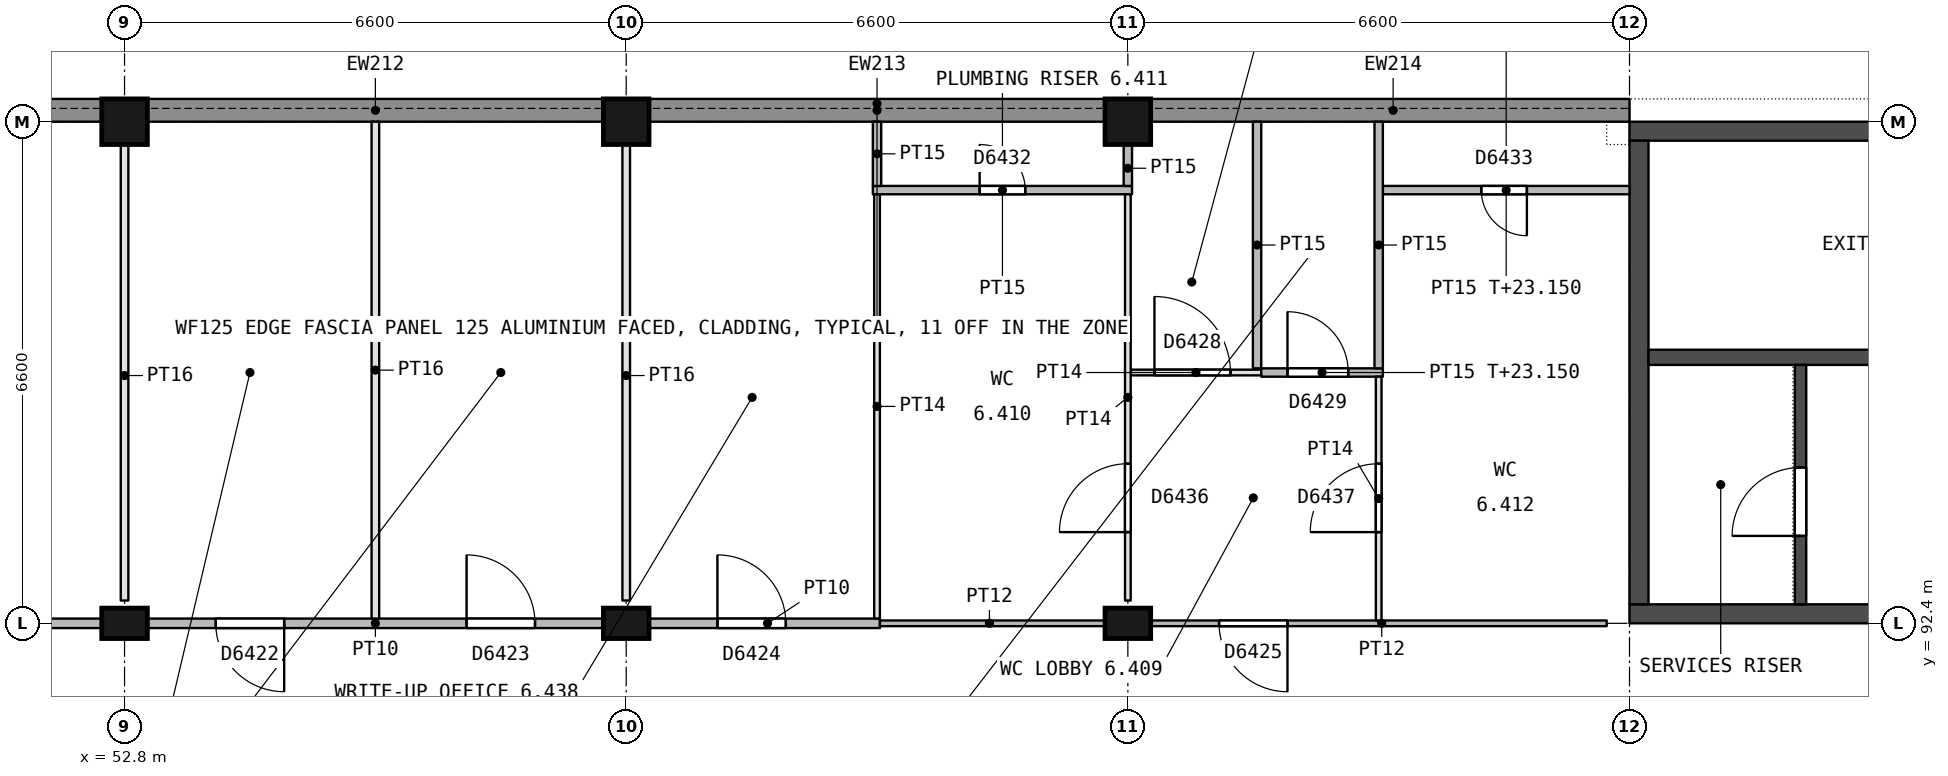
"""IFC4 building model, lengths in metres.
Left out: names, types, materials, properties, quantities, classifications, styles, units other than length and angle.
Written with IfcOpenShell. Run it as: python <this file> out.ifc"""

import sys

from ifc_helpers import new_model, si_unit, direction, frame, frame_2d, origin, origin_2d, place, context, subcontext, project, spatial, rectangle, extrude, element, fill, save


model = new_model("IFC4")
c1 = context("Model", 3, precision=1e-05, world=origin(), true_north=direction((0.0, 1.0)))
c2 = subcontext(c1, "Body", "Model", "MODEL_VIEW")
j1 = project(units=[si_unit("LENGTHUNIT", "METRE"), si_unit("PLANEANGLEUNIT", "RADIAN")], contexts=[c1])
p1 = place(None, origin())
s1 = spatial("IfcSite", under=j1, at=p1, CompositionType="ELEMENT")
p2 = place(p1, origin())
s2 = spatial("IfcBuilding", under=s1, at=p2, CompositionType="ELEMENT")
p3 = place(p2, frame((0.0, 0.0, 18.9)))
s3 = spatial("IfcBuildingStorey", under=s2, at=p3, CompositionType="ELEMENT", Elevation=18.9)
p4 = place(p3, frame((52.8, 92.4, 0.0), z_axis=(0.0, 0.0, 1.0), x_axis=(1.0, 0.0, 0.0)))
e1 = element("IfcColumn", 1, at=p4, inside=s3, PredefinedType="COLUMN", context=c2, shape_type="SweptSolid", body=[
    extrude(rectangle(XDim=0.6, YDim=0.4, at=origin_2d()), origin(), (0.0, 0.0, 1.0), 4.25),
])
p5 = place(p3, frame((52.8, 99.0, 0.0), z_axis=(0.0, 0.0, 1.0), x_axis=(1.0, 0.0, 0.0)))
e2 = element("IfcColumn", 2, at=p5, inside=s3, PredefinedType="COLUMN", context=c2, shape_type="SweptSolid", body=[
    extrude(rectangle(XDim=0.6, YDim=0.6, at=origin_2d()), origin(), (0.0, 0.0, 1.0), 4.25),
])
p6 = place(p3, frame((59.4, 92.4, 0.0), z_axis=(0.0, 0.0, 1.0), x_axis=(1.0, 0.0, 0.0)))
e3 = element("IfcColumn", 3, at=p6, inside=s3, PredefinedType="COLUMN", context=c2, shape_type="SweptSolid", body=[
    extrude(rectangle(XDim=0.6, YDim=0.4, at=origin_2d()), origin(), (0.0, 0.0, 1.0), 4.25),
])
p7 = place(p3, frame((59.4, 99.0, 0.0), z_axis=(0.0, 0.0, 1.0), x_axis=(1.0, 0.0, 0.0)))
e4 = element("IfcColumn", 4, at=p7, inside=s3, PredefinedType="COLUMN", context=c2, shape_type="SweptSolid", body=[
    extrude(rectangle(XDim=0.6, YDim=0.6, at=origin_2d()), origin(), (0.0, 0.0, 1.0), 4.25),
])
p8 = place(p3, frame((66.0, 92.4, 0.0), z_axis=(0.0, 0.0, 1.0), x_axis=(1.0, 0.0, 0.0)))
e5 = element("IfcColumn", 5, at=p8, inside=s3, PredefinedType="COLUMN", context=c2, shape_type="SweptSolid", body=[
    extrude(rectangle(XDim=0.6, YDim=0.4, at=origin_2d()), origin(), (0.0, 0.0, 1.0), 4.25),
])
p9 = place(p3, frame((66.0, 99.0, 0.0), z_axis=(0.0, 0.0, 1.0), x_axis=(1.0, 0.0, 0.0)))
e6 = element("IfcColumn", 6, at=p9, inside=s3, PredefinedType="COLUMN", context=c2, shape_type="SweptSolid", body=[
    extrude(rectangle(XDim=0.6, YDim=0.6, at=origin_2d()), origin(), (0.0, 0.0, 1.0), 4.25),
])
p10 = place(p3, frame((72.6, 92.525, 0.0), z_axis=(0.0, 0.0, 1.0), x_axis=(1.0, 0.0, 0.0)))
e7 = element("IfcWall", 7, at=p10, inside=s3, PredefinedType="SHEAR", context=c2, shape_type="SweptSolid", body=[
    extrude(rectangle(XDim=6.6, YDim=0.25, at=frame_2d((3.3, 0.0))), origin(), (0.0, 0.0, 1.0), 4.25),
])
p11 = place(p10, frame((4.6, 0.0, 0.0)))
e8 = element("IfcOpeningElement", 8, at=p11, cuts=e7, PredefinedType="OPENING", context=c2, shape_type="SweptSolid", body=[
    extrude(rectangle(XDim=1.0, YDim=2.1, at=frame_2d((0.5, 1.05))), frame((0.0, 0.135, 0.0), z_axis=(0.0, -1.0, 0.0), x_axis=(1.0, 0.0, 0.0)), (0.0, 0.0, 1.0), 0.27),
])
p12 = place(p3, frame((72.6, 98.875, 0.0), z_axis=(0.0, 0.0, 1.0), x_axis=(1.0, 0.0, 0.0)))
e9 = element("IfcWall", 9, at=p12, inside=s3, PredefinedType="SHEAR", context=c2, shape_type="SweptSolid", body=[
    extrude(rectangle(XDim=6.6, YDim=0.25, at=frame_2d((3.3, 0.0))), origin(), (0.0, 0.0, 1.0), 4.25),
])
p13 = place(p3, frame((72.725, 92.65, 0.0), z_axis=(0.0, 0.0, 1.0), x_axis=(0.0, 1.0, 0.0)))
e10 = element("IfcWall", 10, at=p13, inside=s3, PredefinedType="SHEAR", context=c2, shape_type="SweptSolid", body=[
    extrude(rectangle(XDim=6.1, YDim=0.25, at=frame_2d((3.05, 0.0))), origin(), (0.0, 0.0, 1.0), 4.25),
])
p14 = place(p3, frame((72.85, 95.9, 0.0), z_axis=(0.0, 0.0, 1.0), x_axis=(1.0, 0.0, 0.0)))
e11 = element("IfcWall", 11, at=p14, inside=s3, PredefinedType="SHEAR", context=c2, shape_type="SweptSolid", body=[
    extrude(rectangle(XDim=6.1, YDim=0.2, at=frame_2d((3.05, 0.0))), origin(), (0.0, 0.0, 1.0), 4.25),
])
p15 = place(p14, frame((4.95, 0.0, 0.0)))
e12 = element("IfcOpeningElement", 12, at=p15, cuts=e11, PredefinedType="OPENING", context=c2, shape_type="SweptSolid", body=[
    extrude(rectangle(XDim=1.0, YDim=2.1, at=frame_2d((0.5, 1.05))), frame((0.0, 0.11, 0.0), z_axis=(0.0, -1.0, 0.0), x_axis=(1.0, 0.0, 0.0)), (0.0, 0.0, 1.0), 0.22),
])
p16 = place(p3, frame((74.85, 92.65, 0.0), z_axis=(0.0, 0.0, 1.0), x_axis=(0.0, 1.0, 0.0)))
e13 = element("IfcWall", 13, at=p16, inside=s3, PredefinedType="SHEAR", context=c2, shape_type="SweptSolid", body=[
    extrude(rectangle(XDim=3.15, YDim=0.15, at=frame_2d((1.575, 0.0))), origin(), (0.0, 0.0, 1.0), 4.25),
])
p17 = place(p16, frame((0.9, 0.0, 0.0)))
e14 = element("IfcOpeningElement", 14, at=p17, cuts=e13, PredefinedType="OPENING", context=c2, shape_type="SweptSolid", body=[
    extrude(rectangle(XDim=0.9, YDim=2.1, at=frame_2d((0.45, 1.05))), frame((0.0, 0.085, 0.0), z_axis=(0.0, -1.0, 0.0), x_axis=(1.0, 0.0, 0.0)), (0.0, 0.0, 1.0), 0.17),
])
for number, where, z_axis, x_axis in (
    (15, (46.5, 99.15, 0.0), (0.0, 0.0, 1.0), (1.0, 0.0, 0.0)),
    (16, (53.1, 99.15, 0.0), (0.0, 0.0, 1.0), (1.0, 0.0, 0.0)),
    (17, (59.7, 99.15, 0.0), (0.0, 0.0, 1.0), (1.0, 0.0, 0.0)),
):
    element("IfcWall", number, at=place(p3, frame(where, z_axis=z_axis, x_axis=x_axis)), inside=s3, PredefinedType="STANDARD", context=c2, shape_type="SweptSolid", body=[
        extrude(rectangle(XDim=6.0, YDim=0.3, at=frame_2d((3.0, 0.0))), origin(), (0.0, 0.0, 1.0), 3.65),
    ])
p18 = place(p3, frame((66.3, 99.15, 0.0), z_axis=(0.0, 0.0, 1.0), x_axis=(1.0, 0.0, 0.0)))
e18 = element("IfcWall", 18, at=p18, inside=s3, PredefinedType="STANDARD", context=c2, shape_type="SweptSolid", body=[
    extrude(rectangle(XDim=6.3, YDim=0.3, at=frame_2d((3.15, 0.0))), origin(), (0.0, 0.0, 1.0), 3.65),
])
p19 = place(p3, frame((46.5, 92.4, 0.0), z_axis=(0.0, 0.0, 1.0), x_axis=(1.0, 0.0, 0.0)))
e19 = element("IfcWall", 19, at=p19, inside=s3, PredefinedType="PARTITIONING", context=c2, shape_type="SweptSolid", body=[
    extrude(rectangle(XDim=6.0, YDim=0.125, at=frame_2d((3.0, 0.0))), origin(), (0.0, 0.0, 1.0), 3.65),
])
p20 = place(p19, frame((0.9, 0.0, 0.0)))
e20 = element("IfcOpeningElement", 20, at=p20, cuts=e19, PredefinedType="OPENING", context=c2, shape_type="SweptSolid", body=[
    extrude(rectangle(XDim=0.9, YDim=2.1, at=frame_2d((0.45, 1.05))), frame((0.0, 0.073, 0.0), z_axis=(0.0, -1.0, 0.0), x_axis=(1.0, 0.0, 0.0)), (0.0, 0.0, 1.0), 0.145),
])
p21 = place(p19, frame((4.2, 0.0, 0.0)))
e21 = element("IfcOpeningElement", 21, at=p21, cuts=e19, PredefinedType="OPENING", context=c2, shape_type="SweptSolid", body=[
    extrude(rectangle(XDim=0.9, YDim=2.1, at=frame_2d((0.45, 1.05))), frame((0.0, 0.073, 0.0), z_axis=(0.0, -1.0, 0.0), x_axis=(1.0, 0.0, 0.0)), (0.0, 0.0, 1.0), 0.145),
])
p22 = place(p3, frame((53.1, 92.4, 0.0), z_axis=(0.0, 0.0, 1.0), x_axis=(1.0, 0.0, 0.0)))
e22 = element("IfcWall", 22, at=p22, inside=s3, PredefinedType="PARTITIONING", context=c2, shape_type="SweptSolid", body=[
    extrude(rectangle(XDim=6.0, YDim=0.125, at=frame_2d((3.0, 0.0))), origin(), (0.0, 0.0, 1.0), 3.65),
])
p23 = place(p22, frame((0.9, 0.0, 0.0)))
e23 = element("IfcOpeningElement", 23, at=p23, cuts=e22, PredefinedType="OPENING", context=c2, shape_type="SweptSolid", body=[
    extrude(rectangle(XDim=0.9, YDim=2.1, at=frame_2d((0.45, 1.05))), frame((0.0, 0.073, 0.0), z_axis=(0.0, -1.0, 0.0), x_axis=(1.0, 0.0, 0.0)), (0.0, 0.0, 1.0), 0.145),
])
p24 = place(p22, frame((4.2, 0.0, 0.0)))
e24 = element("IfcOpeningElement", 24, at=p24, cuts=e22, PredefinedType="OPENING", context=c2, shape_type="SweptSolid", body=[
    extrude(rectangle(XDim=0.9, YDim=2.1, at=frame_2d((0.45, 1.05))), frame((0.0, 0.073, 0.0), z_axis=(0.0, -1.0, 0.0), x_axis=(1.0, 0.0, 0.0)), (0.0, 0.0, 1.0), 0.145),
])
p25 = place(p3, frame((59.7, 92.4, 0.0), z_axis=(0.0, 0.0, 1.0), x_axis=(1.0, 0.0, 0.0)))
e25 = element("IfcWall", 25, at=p25, inside=s3, PredefinedType="PARTITIONING", context=c2, shape_type="SweptSolid", body=[
    extrude(rectangle(XDim=3.038, YDim=0.125, at=frame_2d((1.519, 0.0))), origin(), (0.0, 0.0, 1.0), 3.65),
])
p26 = place(p25, frame((0.9, 0.0, 0.0)))
e26 = element("IfcOpeningElement", 26, at=p26, cuts=e25, PredefinedType="OPENING", context=c2, shape_type="SweptSolid", body=[
    extrude(rectangle(XDim=0.9, YDim=2.1, at=frame_2d((0.45, 1.05))), frame((0.0, 0.073, 0.0), z_axis=(0.0, -1.0, 0.0), x_axis=(1.0, 0.0, 0.0)), (0.0, 0.0, 1.0), 0.145),
])
p27 = place(p3, frame((62.738, 92.4, 0.0), z_axis=(0.0, 0.0, 1.0), x_axis=(1.0, 0.0, 0.0)))
e27 = element("IfcWall", 27, at=p27, inside=s3, PredefinedType="PARTITIONING", context=c2, shape_type="SweptSolid", body=[
    extrude(rectangle(XDim=2.962, YDim=0.075, at=frame_2d((1.481, 0.0))), origin(), (0.0, 0.0, 1.0), 3.65),
])
p28 = place(p3, frame((66.3, 92.4, 0.0), z_axis=(0.0, 0.0, 1.0), x_axis=(1.0, 0.0, 0.0)))
e28 = element("IfcWall", 28, at=p28, inside=s3, PredefinedType="PARTITIONING", context=c2, shape_type="SweptSolid", body=[
    extrude(rectangle(XDim=6.0, YDim=0.075, at=frame_2d((3.0, 0.0))), origin(), (0.0, 0.0, 1.0), 3.65),
])
p29 = place(p28, frame((0.9, 0.0, 0.0)))
e29 = element("IfcOpeningElement", 29, at=p29, cuts=e28, PredefinedType="OPENING", context=c2, shape_type="SweptSolid", body=[
    extrude(rectangle(XDim=0.9, YDim=2.1, at=frame_2d((0.45, 1.05))), frame((0.0, 0.047, 0.0), z_axis=(0.0, -1.0, 0.0), x_axis=(1.0, 0.0, 0.0)), (0.0, 0.0, 1.0), 0.095),
])
p30 = place(p3, frame((67.755, 95.7, 0.0), z_axis=(0.0, 0.0, 1.0), x_axis=(-1.0, 0.0, 0.0)))
e30 = element("IfcWall", 30, at=p30, inside=s3, PredefinedType="PARTITIONING", context=c2, shape_type="SweptSolid", body=[
    extrude(rectangle(XDim=1.718, YDim=0.075, at=frame_2d((0.859, 0.0))), origin(), (0.0, 0.0, 1.0), 3.65),
])
p31 = place(p30, frame((0.405, 0.0, 0.0)))
e31 = element("IfcOpeningElement", 31, at=p31, cuts=e30, PredefinedType="OPENING", context=c2, shape_type="SweptSolid", body=[
    extrude(rectangle(XDim=1.0, YDim=2.1, at=frame_2d((0.5, 1.05))), frame((0.0, 0.047, 0.0), z_axis=(0.0, -1.0, 0.0), x_axis=(1.0, 0.0, 0.0)), (0.0, 0.0, 1.0), 0.095),
])
p32 = place(p3, frame((67.755, 95.7, 0.0), z_axis=(0.0, 0.0, 1.0), x_axis=(1.0, 0.0, 0.0)))
e32 = element("IfcWall", 32, at=p32, inside=s3, PredefinedType="PARTITIONING", context=c2, shape_type="SweptSolid", body=[
    extrude(rectangle(XDim=1.6, YDim=0.11, at=frame_2d((0.8, 0.0))), origin(), (0.0, 0.0, 1.0), 4.25),
])
p33 = place(p32, frame((0.345, 0.0, 0.0)))
e33 = element("IfcOpeningElement", 33, at=p33, cuts=e32, PredefinedType="OPENING", context=c2, shape_type="SweptSolid", body=[
    extrude(rectangle(XDim=0.8, YDim=2.1, at=frame_2d((0.4, 1.05))), frame((0.0, 0.065, 0.0), z_axis=(0.0, -1.0, 0.0), x_axis=(1.0, 0.0, 0.0)), (0.0, 0.0, 1.0), 0.13),
])
p34 = place(p3, frame((66.055, 98.1, 0.0), z_axis=(0.0, 0.0, 1.0), x_axis=(-1.0, 0.0, 0.0)))
e34 = element("IfcWall", 34, at=p34, inside=s3, PredefinedType="PARTITIONING", context=c2, shape_type="SweptSolid", body=[
    extrude(rectangle(XDim=3.41, YDim=0.11, at=frame_2d((1.705, 0.0))), origin(), (0.0, 0.0, 1.0), 3.65),
])
p35 = place(p34, frame((1.405, 0.0, 0.0)))
e35 = element("IfcOpeningElement", 35, at=p35, cuts=e34, PredefinedType="OPENING", context=c2, shape_type="SweptSolid", body=[
    extrude(rectangle(XDim=0.6, YDim=2.1, at=frame_2d((0.3, 1.05))), frame((0.0, 0.065, 0.0), z_axis=(0.0, -1.0, 0.0), x_axis=(1.0, 0.0, 0.0)), (0.0, 0.0, 1.0), 0.13),
])
p36 = place(p3, frame((72.6, 98.1, 0.0), z_axis=(0.0, 0.0, 1.0), x_axis=(-1.0, 0.0, 0.0)))
e36 = element("IfcWall", 36, at=p36, inside=s3, PredefinedType="PARTITIONING", context=c2, shape_type="SweptSolid", body=[
    extrude(rectangle(XDim=3.245, YDim=0.11, at=frame_2d((1.623, 0.0))), origin(), (0.0, 0.0, 1.0), 4.25),
])
p37 = place(p36, frame((1.35, 0.0, 0.0)))
e37 = element("IfcOpeningElement", 37, at=p37, cuts=e36, PredefinedType="OPENING", context=c2, shape_type="SweptSolid", body=[
    extrude(rectangle(XDim=0.6, YDim=2.1, at=frame_2d((0.3, 1.05))), frame((0.0, 0.065, 0.0), z_axis=(0.0, -1.0, 0.0), x_axis=(1.0, 0.0, 0.0)), (0.0, 0.0, 1.0), 0.13),
])
p38 = place(p3, frame((52.8, 92.7, 0.0), z_axis=(0.0, 0.0, 1.0), x_axis=(0.0, 1.0, 0.0)))
e38 = element("IfcWall", 38, at=p38, inside=s3, PredefinedType="PARTITIONING", context=c2, shape_type="SweptSolid", body=[
    extrude(rectangle(XDim=6.0, YDim=0.1, at=frame_2d((3.0, 0.0))), origin(), (0.0, 0.0, 1.0), 3.65),
])
p39 = place(p3, frame((56.1, 92.463, 0.0), z_axis=(0.0, 0.0, 1.0), x_axis=(0.0, 1.0, 0.0)))
e39 = element("IfcWall", 39, at=p39, inside=s3, PredefinedType="PARTITIONING", context=c2, shape_type="SweptSolid", body=[
    extrude(rectangle(XDim=6.537, YDim=0.1, at=frame_2d((3.269, 0.0))), origin(), (0.0, 0.0, 1.0), 3.65),
])
p40 = place(p3, frame((59.4, 92.7, 0.0), z_axis=(0.0, 0.0, 1.0), x_axis=(0.0, 1.0, 0.0)))
e40 = element("IfcWall", 40, at=p40, inside=s3, PredefinedType="PARTITIONING", context=c2, shape_type="SweptSolid", body=[
    extrude(rectangle(XDim=6.0, YDim=0.1, at=frame_2d((3.0, 0.0))), origin(), (0.0, 0.0, 1.0), 3.65),
])
p41 = place(p3, frame((62.7, 92.463, 0.0), z_axis=(0.0, 0.0, 1.0), x_axis=(0.0, 1.0, 0.0)))
e41 = element("IfcWall", 41, at=p41, inside=s3, PredefinedType="PARTITIONING", context=c2, shape_type="SweptSolid", body=[
    extrude(rectangle(XDim=5.582, YDim=0.075, at=frame_2d((2.791, 0.0))), origin(), (0.0, 0.0, 1.0), 3.65),
])
p42 = place(p3, frame((62.7, 98.155, 0.0), z_axis=(0.0, 0.0, 1.0), x_axis=(0.0, 1.0, 0.0)))
e42 = element("IfcWall", 42, at=p42, inside=s3, PredefinedType="PARTITIONING", context=c2, shape_type="SweptSolid", body=[
    extrude(rectangle(XDim=0.845, YDim=0.11, at=frame_2d((0.422, 0.0))), origin(), (0.0, 0.0, 1.0), 3.65),
])
p43 = place(p3, frame((66.0, 92.7, 0.0), z_axis=(0.0, 0.0, 1.0), x_axis=(0.0, 1.0, 0.0)))
e43 = element("IfcWall", 43, at=p43, inside=s3, PredefinedType="PARTITIONING", context=c2, shape_type="SweptSolid", body=[
    extrude(rectangle(XDim=5.345, YDim=0.075, at=frame_2d((2.672, 0.0))), origin(), (0.0, 0.0, 1.0), 3.65),
])
p44 = place(p43, frame((0.9, 0.0, 0.0)))
e44 = element("IfcOpeningElement", 44, at=p44, cuts=e43, PredefinedType="OPENING", context=c2, shape_type="SweptSolid", body=[
    extrude(rectangle(XDim=0.9, YDim=2.1, at=frame_2d((0.45, 1.05))), frame((0.0, 0.047, 0.0), z_axis=(0.0, -1.0, 0.0), x_axis=(1.0, 0.0, 0.0)), (0.0, 0.0, 1.0), 0.095),
])
p45 = place(p3, frame((66.0, 98.155, 0.0), z_axis=(0.0, 0.0, 1.0), x_axis=(0.0, 1.0, 0.0)))
e45 = element("IfcWall", 45, at=p45, inside=s3, PredefinedType="PARTITIONING", context=c2, shape_type="SweptSolid", body=[
    extrude(rectangle(XDim=0.545, YDim=0.11, at=frame_2d((0.272, 0.0))), origin(), (0.0, 0.0, 1.0), 3.65),
])
p46 = place(p3, frame((67.7, 95.755, 0.0), z_axis=(0.0, 0.0, 1.0), x_axis=(0.0, 1.0, 0.0)))
e46 = element("IfcWall", 46, at=p46, inside=s3, PredefinedType="PARTITIONING", context=c2, shape_type="SweptSolid", body=[
    extrude(rectangle(XDim=3.245, YDim=0.11, at=frame_2d((1.623, 0.0))), origin(), (0.0, 0.0, 1.0), 3.65),
])
p47 = place(p3, frame((69.3, 95.645, 0.0), z_axis=(0.0, 0.0, 1.0), x_axis=(0.0, -1.0, 0.0)))
e47 = element("IfcWall", 47, at=p47, inside=s3, PredefinedType="PARTITIONING", context=c2, shape_type="SweptSolid", body=[
    extrude(rectangle(XDim=3.207, YDim=0.075, at=frame_2d((1.604, 0.0))), origin(), (0.0, 0.0, 1.0), 3.65),
])
p48 = place(p47, frame((1.145, 0.0, 0.0)))
e48 = element("IfcOpeningElement", 48, at=p48, cuts=e47, PredefinedType="OPENING", context=c2, shape_type="SweptSolid", body=[
    extrude(rectangle(XDim=0.9, YDim=2.1, at=frame_2d((0.45, 1.05))), frame((0.0, 0.047, 0.0), z_axis=(0.0, -1.0, 0.0), x_axis=(1.0, 0.0, 0.0)), (0.0, 0.0, 1.0), 0.095),
])
p49 = place(p3, frame((69.3, 95.755, 0.0), z_axis=(0.0, 0.0, 1.0), x_axis=(0.0, 1.0, 0.0)))
e49 = element("IfcWall", 49, at=p49, inside=s3, PredefinedType="PARTITIONING", context=c2, shape_type="SweptSolid", body=[
    extrude(rectangle(XDim=3.245, YDim=0.11, at=frame_2d((1.623, 0.0))), origin(), (0.0, 0.0, 1.0), 3.65),
])
p50 = place(p17, origin())
e50 = element("IfcDoor", 50, at=p50, inside=s3, OperationType="SINGLE_SWING_LEFT", PredefinedType="DOOR", context=c2, shape_type="SweptSolid", body=[
    extrude(rectangle(XDim=0.9, YDim=2.1, at=frame_2d((0.45, 1.05))), frame((0.0, 0.025, 0.0), z_axis=(0.0, -1.0, 0.0), x_axis=(1.0, 0.0, 0.0)), (0.0, 0.0, 1.0), 0.05),
])
fill(e14, e50)
p51 = place(p23, origin())
e51 = element("IfcDoor", 51, at=p51, inside=s3, OperationType="SINGLE_SWING_RIGHT", PredefinedType="DOOR", context=c2, shape_type="SweptSolid", body=[
    extrude(rectangle(XDim=0.9, YDim=2.1, at=frame_2d((0.45, 1.05))), frame((0.0, 0.025, 0.0), z_axis=(0.0, -1.0, 0.0), x_axis=(1.0, 0.0, 0.0)), (0.0, 0.0, 1.0), 0.05),
])
fill(e23, e51)
p52 = place(p24, origin())
e52 = element("IfcDoor", 52, at=p52, inside=s3, OperationType="SINGLE_SWING_LEFT", PredefinedType="DOOR", context=c2, shape_type="SweptSolid", body=[
    extrude(rectangle(XDim=0.9, YDim=2.1, at=frame_2d((0.45, 1.05))), frame((0.0, 0.025, 0.0), z_axis=(0.0, -1.0, 0.0), x_axis=(1.0, 0.0, 0.0)), (0.0, 0.0, 1.0), 0.05),
])
fill(e24, e52)
p53 = place(p26, origin())
e53 = element("IfcDoor", 53, at=p53, inside=s3, OperationType="SINGLE_SWING_LEFT", PredefinedType="DOOR", context=c2, shape_type="SweptSolid", body=[
    extrude(rectangle(XDim=0.9, YDim=2.1, at=frame_2d((0.45, 1.05))), frame((0.0, 0.025, 0.0), z_axis=(0.0, -1.0, 0.0), x_axis=(1.0, 0.0, 0.0)), (0.0, 0.0, 1.0), 0.05),
])
fill(e26, e53)
p54 = place(p29, origin())
e54 = element("IfcDoor", 54, at=p54, inside=s3, OperationType="SINGLE_SWING_RIGHT", PredefinedType="DOOR", context=c2, shape_type="SweptSolid", body=[
    extrude(rectangle(XDim=0.9, YDim=2.1, at=frame_2d((0.45, 1.05))), frame((0.0, 0.025, 0.0), z_axis=(0.0, -1.0, 0.0), x_axis=(1.0, 0.0, 0.0)), (0.0, 0.0, 1.0), 0.05),
])
fill(e29, e54)
p55 = place(p31, origin())
e55 = element("IfcDoor", 55, at=p55, inside=s3, OperationType="SINGLE_SWING_RIGHT", PredefinedType="DOOR", context=c2, shape_type="SweptSolid", body=[
    extrude(rectangle(XDim=1.0, YDim=2.1, at=frame_2d((0.5, 1.05))), frame((0.0, 0.025, 0.0), z_axis=(0.0, -1.0, 0.0), x_axis=(1.0, 0.0, 0.0)), (0.0, 0.0, 1.0), 0.05),
])
fill(e31, e55)
p56 = place(p33, origin())
e56 = element("IfcDoor", 56, at=p56, inside=s3, OperationType="SINGLE_SWING_LEFT", PredefinedType="DOOR", context=c2, shape_type="SweptSolid", body=[
    extrude(rectangle(XDim=0.8, YDim=2.1, at=frame_2d((0.4, 1.05))), frame((0.0, 0.025, 0.0), z_axis=(0.0, -1.0, 0.0), x_axis=(1.0, 0.0, 0.0)), (0.0, 0.0, 1.0), 0.05),
])
fill(e33, e56)
p57 = place(p35, origin())
e57 = element("IfcDoor", 57, at=p57, inside=s3, OperationType="SINGLE_SWING_RIGHT", PredefinedType="DOOR", context=c2, shape_type="SweptSolid", body=[
    extrude(rectangle(XDim=0.6, YDim=2.1, at=frame_2d((0.3, 1.05))), frame((0.0, 0.025, 0.0), z_axis=(0.0, -1.0, 0.0), x_axis=(1.0, 0.0, 0.0)), (0.0, 0.0, 1.0), 0.05),
])
fill(e35, e57)
p58 = place(p37, origin())
e58 = element("IfcDoor", 58, at=p58, inside=s3, OperationType="SINGLE_SWING_LEFT", PredefinedType="DOOR", context=c2, shape_type="SweptSolid", body=[
    extrude(rectangle(XDim=0.6, YDim=2.1, at=frame_2d((0.3, 1.05))), frame((0.0, 0.025, 0.0), z_axis=(0.0, -1.0, 0.0), x_axis=(1.0, 0.0, 0.0)), (0.0, 0.0, 1.0), 0.05),
])
fill(e37, e58)
p59 = place(p44, origin())
e59 = element("IfcDoor", 59, at=p59, inside=s3, OperationType="SINGLE_SWING_LEFT", PredefinedType="DOOR", context=c2, shape_type="SweptSolid", body=[
    extrude(rectangle(XDim=0.9, YDim=2.1, at=frame_2d((0.45, 1.05))), frame((0.0, 0.025, 0.0), z_axis=(0.0, -1.0, 0.0), x_axis=(1.0, 0.0, 0.0)), (0.0, 0.0, 1.0), 0.05),
])
fill(e44, e59)
p60 = place(p48, origin())
e60 = element("IfcDoor", 60, at=p60, inside=s3, OperationType="SINGLE_SWING_RIGHT", PredefinedType="DOOR", context=c2, shape_type="SweptSolid", body=[
    extrude(rectangle(XDim=0.9, YDim=2.1, at=frame_2d((0.45, 1.05))), frame((0.0, 0.025, 0.0), z_axis=(0.0, -1.0, 0.0), x_axis=(1.0, 0.0, 0.0)), (0.0, 0.0, 1.0), 0.05),
])
fill(e48, e60)
save(model, sys.argv[1])
